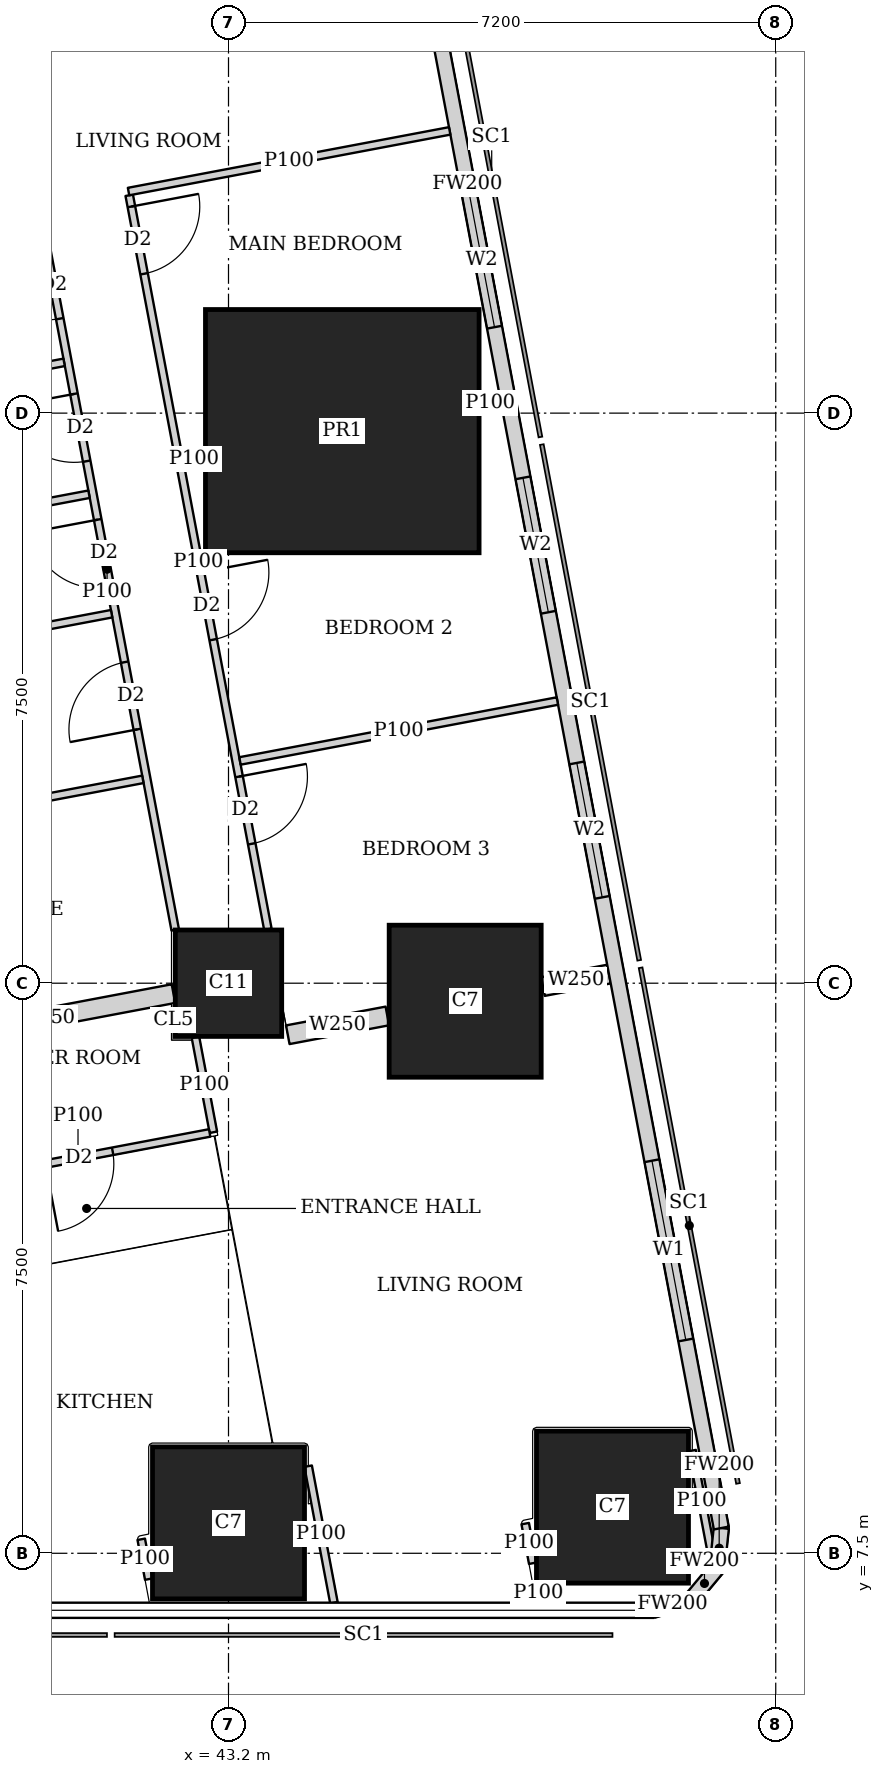
"""IFC4 building model, lengths in metres.
Left out: names, types, materials, properties, quantities, classifications, styles, units other than length and angle.
Written with IfcOpenShell. Run it as: python <this file> out.ifc"""

import sys

from ifc_helpers import new_model, si_unit, direction, frame, frame_2d, origin, origin_2d, place, context, subcontext, project, spatial, rectangle, extrude, element, fill, save


model = new_model("IFC4")
c1 = context("Model", 3, precision=1e-05, world=origin(), true_north=direction((0.0, 1.0)))
c2 = subcontext(c1, "Body", "Model", "MODEL_VIEW")
j1 = project(units=[si_unit("LENGTHUNIT", "METRE"), si_unit("PLANEANGLEUNIT", "RADIAN")], contexts=[c1])
p1 = place(None, origin())
s1 = spatial("IfcSite", under=j1, at=p1, CompositionType="ELEMENT")
p2 = place(p1, origin())
s2 = spatial("IfcBuilding", under=s1, at=p2, CompositionType="ELEMENT")
p3 = place(p2, frame((0.0, 0.0, 277.85)))
s3 = spatial("IfcBuildingStorey", under=s2, at=p3, CompositionType="ELEMENT", Elevation=277.85)
for number, where, z_axis, x_axis in (
    (1, (43.2, 7.9, 0.0), (0.0, 0.0, 1.0), (1.0, 0.0, 0.0)),
    (2, (48.252, 8.107, 0.0), (0.0, 0.0, 1.0), (1.0, 0.0, 0.0)),
):
    element("IfcColumn", number, at=place(p3, frame(where, z_axis=z_axis, x_axis=x_axis)), inside=s3, PredefinedType="COLUMN", context=c2, shape_type="SweptSolid", body=[
        extrude(rectangle(XDim=2.0, YDim=2.0, at=origin_2d()), origin(), (0.0, 0.0, 1.0), 3.75),
    ])
p4 = place(p3, frame((43.2, 15.0, 0.0), z_axis=(0.0, 0.0, 1.0), x_axis=(1.0, 0.0, 0.0)))
e3 = element("IfcColumn", 3, at=p4, inside=s3, PredefinedType="COLUMN", context=c2, shape_type="SweptSolid", body=[
    extrude(rectangle(XDim=1.4, YDim=1.4, at=origin_2d()), origin(), (0.0, 0.0, 1.0), 3.75),
])
p5 = place(p3, frame((46.314, 14.763, 0.0), z_axis=(0.0, 0.0, 1.0), x_axis=(1.0, 0.0, 0.0)))
e4 = element("IfcColumn", 4, at=p5, inside=s3, PredefinedType="COLUMN", context=c2, shape_type="SweptSolid", body=[
    extrude(rectangle(XDim=2.0, YDim=2.0, at=origin_2d()), origin(), (0.0, 0.0, 1.0), 3.75),
])
p6 = place(p3, frame((44.697, 22.263, 0.0), z_axis=(0.0, 0.0, 1.0), x_axis=(1.0, 0.0, 0.0)))
e5 = element("IfcColumn", 5, at=p6, inside=s3, PredefinedType="COLUMN", context=c2, shape_type="SweptSolid", body=[
    extrude(rectangle(XDim=3.6, YDim=3.2, at=origin_2d()), origin(), (0.0, 0.0, 1.0), 3.75),
])
p7 = place(p3, frame((48.787, 6.75, 0.0), z_axis=(0.0, 0.0, 1.0), x_axis=(0.957282247819, 0.289155145225, 0.0)))
e6 = element("IfcWall", 6, at=p7, inside=s3, PredefinedType="SOLIDWALL", context=c2, shape_type="SweptSolid", body=[
    extrude(rectangle(XDim=0.533, YDim=0.2, at=frame_2d((0.266, 0.0))), origin(), (0.0, 0.0, 1.0), 3.5),
])
p8 = place(p3, frame((49.297, 6.904, 0.0), z_axis=(0.0, 0.0, 1.0), x_axis=(0.639255849474, 0.768994121508, 0.0)))
e7 = element("IfcWall", 7, at=p8, inside=s3, PredefinedType="SOLIDWALL", context=c2, shape_type="SweptSolid", body=[
    extrude(rectangle(XDim=0.518, YDim=0.2, at=frame_2d((0.259, 0.0))), origin(), (0.0, 0.0, 1.0), 3.5),
])
p9 = place(p3, frame((49.628, 7.302, 0.0), z_axis=(0.0, 0.0, 1.0), x_axis=(0.105352390132, 0.994434952068, 0.0)))
e8 = element("IfcWall", 8, at=p9, inside=s3, PredefinedType="SOLIDWALL", context=c2, shape_type="SweptSolid", body=[
    extrude(rectangle(XDim=0.533, YDim=0.2, at=frame_2d((0.267, 0.0))), origin(), (0.0, 0.0, 1.0), 3.5),
])
p10 = place(p3, frame((49.684, 7.832, 0.0), z_axis=(0.0, 0.0, 1.0), x_axis=(-0.185616669694, 0.982622232565, 0.0)))
e9 = element("IfcWall", 9, at=p10, inside=s3, PredefinedType="SOLIDWALL", context=c2, shape_type="SweptSolid", body=[
    extrude(rectangle(XDim=36.0, YDim=0.2, at=frame_2d((18.0, 0.0))), origin(), (0.0, 0.0, 1.0), 3.5),
])
p11 = place(p10, frame((2.518, 0.0, 0.9)))
e10 = element("IfcOpeningElement", 10, at=p11, cuts=e9, PredefinedType="OPENING", context=c2, shape_type="SweptSolid", body=[
    extrude(rectangle(XDim=2.4, YDim=1.5, at=frame_2d((1.2, 0.75))), frame((0.0, 0.11, 0.0), z_axis=(0.0, -1.0, 0.0), x_axis=(1.0, 0.0, 0.0)), (0.0, 0.0, 1.0), 0.22),
])
p12 = place(p10, frame((8.444, 0.0, 0.9)))
e11 = element("IfcOpeningElement", 11, at=p12, cuts=e9, PredefinedType="OPENING", context=c2, shape_type="SweptSolid", body=[
    extrude(rectangle(XDim=1.8, YDim=1.5, at=frame_2d((0.9, 0.75))), frame((0.0, 0.11, 0.0), z_axis=(0.0, -1.0, 0.0), x_axis=(1.0, 0.0, 0.0)), (0.0, 0.0, 1.0), 0.22),
])
p13 = place(p10, frame((12.261, 0.0, 0.9)))
e12 = element("IfcOpeningElement", 12, at=p13, cuts=e9, PredefinedType="OPENING", context=c2, shape_type="SweptSolid", body=[
    extrude(rectangle(XDim=1.8, YDim=1.5, at=frame_2d((0.9, 0.75))), frame((0.0, 0.11, 0.0), z_axis=(0.0, -1.0, 0.0), x_axis=(1.0, 0.0, 0.0)), (0.0, 0.0, 1.0), 0.22),
])
p14 = place(p10, frame((16.078, 0.0, 0.9)))
e13 = element("IfcOpeningElement", 13, at=p14, cuts=e9, PredefinedType="OPENING", context=c2, shape_type="SweptSolid", body=[
    extrude(rectangle(XDim=1.8, YDim=1.5, at=frame_2d((0.9, 0.75))), frame((0.0, 0.11, 0.0), z_axis=(0.0, -1.0, 0.0), x_axis=(1.0, 0.0, 0.0)), (0.0, 0.0, 1.0), 0.22),
])
p15 = place(p10, frame((19.894, 0.0, 0.9)))
e14 = element("IfcOpeningElement", 14, at=p15, cuts=e9, PredefinedType="OPENING", context=c2, shape_type="SweptSolid", body=[
    extrude(rectangle(XDim=1.8, YDim=1.5, at=frame_2d((0.9, 0.75))), frame((0.0, 0.11, 0.0), z_axis=(0.0, -1.0, 0.0), x_axis=(1.0, 0.0, 0.0)), (0.0, 0.0, 1.0), 0.22),
])
p16 = place(p10, frame((23.71, 0.0, 0.9)))
e15 = element("IfcOpeningElement", 15, at=p16, cuts=e9, PredefinedType="OPENING", context=c2, shape_type="SweptSolid", body=[
    extrude(rectangle(XDim=1.8, YDim=1.5, at=frame_2d((0.9, 0.75))), frame((0.0, 0.11, 0.0), z_axis=(0.0, -1.0, 0.0), x_axis=(1.0, 0.0, 0.0)), (0.0, 0.0, 1.0), 0.22),
])
p17 = place(p10, frame((27.526, 0.0, 0.9)))
e16 = element("IfcOpeningElement", 16, at=p17, cuts=e9, PredefinedType="OPENING", context=c2, shape_type="SweptSolid", body=[
    extrude(rectangle(XDim=1.8, YDim=1.5, at=frame_2d((0.9, 0.75))), frame((0.0, 0.11, 0.0), z_axis=(0.0, -1.0, 0.0), x_axis=(1.0, 0.0, 0.0)), (0.0, 0.0, 1.0), 0.22),
])
p18 = place(p10, frame((32.046, 0.0, 0.9)))
e17 = element("IfcOpeningElement", 17, at=p18, cuts=e9, PredefinedType="OPENING", context=c2, shape_type="SweptSolid", body=[
    extrude(rectangle(XDim=1.8, YDim=1.5, at=frame_2d((0.9, 0.75))), frame((0.0, 0.11, 0.0), z_axis=(0.0, -1.0, 0.0), x_axis=(1.0, 0.0, 0.0)), (0.0, 0.0, 1.0), 0.22),
])
p19 = place(p3, frame((44.248, 8.646, 0.0), z_axis=(0.0, 0.0, 1.0), x_axis=(0.185417594585, -0.982659816833, 0.0)))
e18 = element("IfcWall", 18, at=p19, inside=s3, PredefinedType="PARTITIONING", context=c2, shape_type="SweptSolid", body=[
    extrude(rectangle(XDim=1.828, YDim=0.1, at=frame_2d((0.914, 0.0))), origin(), (0.0, 0.0, 1.0), 2.05),
])
p20 = place(p3, frame((42.151, 7.16, 0.0), z_axis=(0.0, 0.0, 1.0), x_axis=(-0.185366164644, 0.982669519729, 0.0)))
e19 = element("IfcWall", 19, at=p20, inside=s3, PredefinedType="PARTITIONING", context=c2, shape_type="SweptSolid", body=[
    extrude(rectangle(XDim=0.533, YDim=0.1, at=frame_2d((0.267, 0.0))), origin(), (0.0, 0.0, 1.0), 2.5),
])
p21 = place(p3, frame((49.3, 8.851, 0.0), z_axis=(0.0, 0.0, 1.0), x_axis=(0.18581620423, -0.982584519645, 0.0)))
e20 = element("IfcWall", 20, at=p21, inside=s3, PredefinedType="PARTITIONING", context=c2, shape_type="SweptSolid", body=[
    extrude(rectangle(XDim=1.351, YDim=0.1, at=frame_2d((0.675, 0.0))), origin(), (0.0, 0.0, 1.0), 3.5),
])
p22 = place(p3, frame((47.301, 6.85, 0.0), z_axis=(0.0, 0.0, 1.0), x_axis=(-0.187513903188, 0.982261948826, 0.0)))
e21 = element("IfcWall", 21, at=p22, inside=s3, PredefinedType="PARTITIONING", context=c2, shape_type="SweptSolid", body=[
    extrude(rectangle(XDim=0.251, YDim=0.1, at=frame_2d((0.125, 0.0))), origin(), (0.0, 0.0, 1.0), 3.5),
])
p23 = place(p3, frame((47.203, 7.369, 0.0), z_axis=(0.0, 0.0, 1.0), x_axis=(-0.186456243114, 0.982463266185, 0.0)))
e22 = element("IfcWall", 22, at=p23, inside=s3, PredefinedType="PARTITIONING", context=c2, shape_type="SweptSolid", body=[
    extrude(rectangle(XDim=0.53, YDim=0.1, at=frame_2d((0.265, 0.0))), origin(), (0.0, 0.0, 1.0), 2.05),
])
p24 = place(p3, frame((41.894, 25.366, 0.0), z_axis=(0.0, 0.0, 1.0), x_axis=(0.185612905165, -0.982622943675, 0.0)))
e23 = element("IfcWall", 23, at=p24, inside=s3, PredefinedType="PARTITIONING", context=c2, shape_type="SweptSolid", body=[
    extrude(rectangle(XDim=9.827, YDim=0.1, at=frame_2d((4.913, 0.0))), origin(), (0.0, 0.0, 1.0), 2.5),
])
p25 = place(p24, frame((0.151, 0.0, 0.0)))
e24 = element("IfcOpeningElement", 24, at=p25, cuts=e23, PredefinedType="OPENING", context=c2, shape_type="SweptSolid", body=[
    extrude(rectangle(XDim=0.9, YDim=2.1, at=frame_2d((0.45, 1.05))), frame((0.0, 0.06, 0.0), z_axis=(0.0, -1.0, 0.0), x_axis=(1.0, 0.0, 0.0)), (0.0, 0.0, 1.0), 0.12),
])
p26 = place(p24, frame((5.05, 0.0, 0.0)))
e25 = element("IfcOpeningElement", 25, at=p26, cuts=e23, PredefinedType="OPENING", context=c2, shape_type="SweptSolid", body=[
    extrude(rectangle(XDim=0.9, YDim=2.1, at=frame_2d((0.45, 1.05))), frame((0.0, 0.06, 0.0), z_axis=(0.0, -1.0, 0.0), x_axis=(1.0, 0.0, 0.0)), (0.0, 0.0, 1.0), 0.12),
])
p27 = place(p24, frame((7.783, 0.0, 0.0)))
e26 = element("IfcOpeningElement", 26, at=p27, cuts=e23, PredefinedType="OPENING", context=c2, shape_type="SweptSolid", body=[
    extrude(rectangle(XDim=0.9, YDim=2.1, at=frame_2d((0.45, 1.05))), frame((0.0, 0.06, 0.0), z_axis=(0.0, -1.0, 0.0), x_axis=(1.0, 0.0, 0.0)), (0.0, 0.0, 1.0), 0.12),
])
p28 = place(p3, frame((40.706, 25.192, 0.0), z_axis=(0.0, 0.0, 1.0), x_axis=(0.185629824463, -0.982619747547, 0.0)))
e27 = element("IfcWall", 27, at=p28, inside=s3, PredefinedType="PARTITIONING", context=c2, shape_type="SweptSolid", body=[
    extrude(rectangle(XDim=9.659, YDim=0.1, at=frame_2d((4.83, 0.0))), origin(), (0.0, 0.0, 1.0), 2.5),
])
p29 = place(p28, frame((0.575, 0.0, 0.0)))
e28 = element("IfcOpeningElement", 28, at=p29, cuts=e27, PredefinedType="OPENING", context=c2, shape_type="SweptSolid", body=[
    extrude(rectangle(XDim=0.9, YDim=2.1, at=frame_2d((0.45, 1.05))), frame((0.0, 0.06, 0.0), z_axis=(0.0, -1.0, 0.0), x_axis=(1.0, 0.0, 0.0)), (0.0, 0.0, 1.0), 0.12),
])
p30 = place(p28, frame((4.166, 0.0, 0.0)))
e29 = element("IfcOpeningElement", 29, at=p30, cuts=e27, PredefinedType="OPENING", context=c2, shape_type="SweptSolid", body=[
    extrude(rectangle(XDim=0.9, YDim=2.1, at=frame_2d((0.45, 1.05))), frame((0.0, 0.06, 0.0), z_axis=(0.0, -1.0, 0.0), x_axis=(1.0, 0.0, 0.0)), (0.0, 0.0, 1.0), 0.12),
])
p31 = place(p28, frame((2.483, 0.0, 0.0)))
e30 = element("IfcOpeningElement", 30, at=p31, cuts=e27, PredefinedType="OPENING", context=c2, shape_type="SweptSolid", body=[
    extrude(rectangle(XDim=0.9, YDim=2.1, at=frame_2d((0.45, 1.05))), frame((0.0, 0.06, 0.0), z_axis=(0.0, -1.0, 0.0), x_axis=(1.0, 0.0, 0.0)), (0.0, 0.0, 1.0), 0.12),
])
p32 = place(p28, frame((6.074, 0.0, 0.0)))
e31 = element("IfcOpeningElement", 31, at=p32, cuts=e27, PredefinedType="OPENING", context=c2, shape_type="SweptSolid", body=[
    extrude(rectangle(XDim=0.9, YDim=2.1, at=frame_2d((0.45, 1.05))), frame((0.0, 0.06, 0.0), z_axis=(0.0, -1.0, 0.0), x_axis=(1.0, 0.0, 0.0)), (0.0, 0.0, 1.0), 0.12),
])
p33 = place(p3, frame((46.11, 26.213, 0.0), z_axis=(0.0, 0.0, 1.0), x_axis=(-0.982633535512, -0.185556823879, 0.0)))
e32 = element("IfcWall", 32, at=p33, inside=s3, PredefinedType="PARTITIONING", context=c2, shape_type="SweptSolid", body=[
    extrude(rectangle(XDim=4.3, YDim=0.1, at=frame_2d((2.15, 0.0))), origin(), (0.0, 0.0, 1.0), 2.5),
])
p34 = place(p3, frame((46.782, 22.657, 0.0), z_axis=(0.0, 0.0, 1.0), x_axis=(-0.982574553168, -0.185868898601, 0.0)))
e33 = element("IfcWall", 33, at=p34, inside=s3, PredefinedType="PARTITIONING", context=c2, shape_type="SweptSolid", body=[
    extrude(rectangle(XDim=0.28, YDim=0.1, at=frame_2d((0.14, 0.0))), origin(), (0.0, 0.0, 1.0), 3.5),
])
p35 = place(p3, frame((42.887, 21.921, 0.0), z_axis=(0.0, 0.0, 1.0), x_axis=(-0.982688058078, -0.185267861514, 0.0)))
e34 = element("IfcWall", 34, at=p35, inside=s3, PredefinedType="PARTITIONING", context=c2, shape_type="SweptSolid", body=[
    extrude(rectangle(XDim=0.286, YDim=0.1, at=frame_2d((0.143, 0.0))), origin(), (0.0, 0.0, 1.0), 2.5),
])
p36 = place(p3, frame((47.527, 18.712, 0.0), z_axis=(0.0, 0.0, 1.0), x_axis=(-0.982665405803, -0.185387972203, 0.0)))
e35 = element("IfcWall", 35, at=p36, inside=s3, PredefinedType="PARTITIONING", context=c2, shape_type="SweptSolid", body=[
    extrude(rectangle(XDim=4.25, YDim=0.1, at=frame_2d((2.125, 0.0))), origin(), (0.0, 0.0, 1.0), 2.5),
])
p37 = place(p3, frame((41.365, 21.433, 0.0), z_axis=(0.0, 0.0, 1.0), x_axis=(-0.982638553676, -0.185530247748, 0.0)))
e36 = element("IfcWall", 36, at=p37, inside=s3, PredefinedType="PARTITIONING", context=c2, shape_type="SweptSolid", body=[
    extrude(rectangle(XDim=3.525, YDim=0.1, at=frame_2d((1.763, 0.0))), origin(), (0.0, 0.0, 1.0), 3.5),
])
p38 = place(p3, frame((42.073, 17.682, 0.0), z_axis=(0.0, 0.0, 1.0), x_axis=(-0.98265117712, -0.185463376723, 0.0)))
e37 = element("IfcWall", 37, at=p38, inside=s3, PredefinedType="PARTITIONING", context=c2, shape_type="SweptSolid", body=[
    extrude(rectangle(XDim=3.525, YDim=0.1, at=frame_2d((1.763, 0.0))), origin(), (0.0, 0.0, 1.0), 3.5),
])
p39 = place(p38, frame((1.325, 0.0, 0.0)))
e38 = element("IfcOpeningElement", 38, at=p39, cuts=e37, PredefinedType="OPENING", context=c2, shape_type="SweptSolid", body=[
    extrude(rectangle(XDim=0.9, YDim=2.1, at=frame_2d((0.45, 1.05))), frame((0.0, 0.06, 0.0), z_axis=(0.0, -1.0, 0.0), x_axis=(1.0, 0.0, 0.0)), (0.0, 0.0, 1.0), 0.12),
])
p40 = place(p3, frame((41.037, 23.168, 0.0), z_axis=(0.0, 0.0, 1.0), x_axis=(-0.982638553676, -0.185530247748, 0.0)))
e39 = element("IfcWall", 39, at=p40, inside=s3, PredefinedType="PARTITIONING", context=c2, shape_type="SweptSolid", body=[
    extrude(rectangle(XDim=3.525, YDim=0.1, at=frame_2d((1.763, 0.0))), origin(), (0.0, 0.0, 1.0), 2.5),
])
p41 = place(p3, frame((41.662, 19.861, 0.0), z_axis=(0.0, 0.0, 1.0), x_axis=(-0.982588017646, -0.185797706064, 0.0)))
e40 = element("IfcWall", 40, at=p41, inside=s3, PredefinedType="PARTITIONING", context=c2, shape_type="SweptSolid", body=[
    extrude(rectangle(XDim=3.525, YDim=0.1, at=frame_2d((1.763, 0.0))), origin(), (0.0, 0.0, 1.0), 3.5),
])
p42 = place(p3, frame((42.765, 14.29, 0.0), z_axis=(0.0, 0.0, 1.0), x_axis=(0.185446293138, -0.982654401283, 0.0)))
e41 = element("IfcWall", 41, at=p42, inside=s3, PredefinedType="PARTITIONING", context=c2, shape_type="SweptSolid", body=[
    extrude(rectangle(XDim=1.273, YDim=0.1, at=frame_2d((0.636, 0.0))), origin(), (0.0, 0.0, 1.0), 3.5),
])
p43 = place(p3, frame((42.952, 13.03, 0.0), z_axis=(0.0, 0.0, 1.0), x_axis=(-0.982585626838, -0.185810349366, 0.0)))
e42 = element("IfcWall", 42, at=p43, inside=s3, PredefinedType="PARTITIONING", context=c2, shape_type="SweptSolid", body=[
    extrude(rectangle(XDim=3.525, YDim=0.1, at=frame_2d((1.763, 0.0))), origin(), (0.0, 0.0, 1.0), 3.5),
])
p44 = place(p43, frame((1.299, 0.0, 0.0)))
e43 = element("IfcOpeningElement", 43, at=p44, cuts=e42, PredefinedType="OPENING", context=c2, shape_type="SweptSolid", body=[
    extrude(rectangle(XDim=0.9, YDim=2.1, at=frame_2d((0.45, 1.05))), frame((0.0, 0.06, 0.0), z_axis=(0.0, -1.0, 0.0), x_axis=(1.0, 0.0, 0.0)), (0.0, 0.0, 1.0), 0.12),
])
p45 = place(p3, frame((48.206, 15.12, 0.0), z_axis=(0.0, 0.0, 1.0), x_axis=(-0.982608419258, -0.185689780017, 0.0)))
e44 = element("IfcWall", 44, at=p45, inside=s3, PredefinedType="SOLIDWALL", context=c2, shape_type="SweptSolid", body=[
    extrude(rectangle(XDim=0.884, YDim=0.25, at=frame_2d((0.442, 0.0))), origin(), (0.0, 0.0, 1.0), 3.5),
])
p46 = place(p3, frame((45.29, 14.569, 0.0), z_axis=(0.0, 0.0, 1.0), x_axis=(-0.982676759201, -0.185327782391, 0.0)))
e45 = element("IfcWall", 45, at=p46, inside=s3, PredefinedType="SOLIDWALL", context=c2, shape_type="SweptSolid", body=[
    extrude(rectangle(XDim=1.333, YDim=0.25, at=frame_2d((0.667, 0.0))), origin(), (0.0, 0.0, 1.0), 3.5),
])
p47 = place(p3, frame((42.476, 14.863, 0.0), z_axis=(0.0, 0.0, 1.0), x_axis=(-0.982603567712, -0.185715450942, 0.0)))
e46 = element("IfcWall", 46, at=p47, inside=s3, PredefinedType="SOLIDWALL", context=c2, shape_type="SweptSolid", body=[
    extrude(rectangle(XDim=3.398, YDim=0.25, at=frame_2d((1.699, 0.0))), origin(), (0.0, 0.0, 1.0), 3.5),
])
p48 = place(p11, origin())
e47 = element("IfcWindow", 47, at=p48, inside=s3, PartitioningType="SINGLE_PANEL", PredefinedType="WINDOW", context=c2, shape_type="SweptSolid", body=[
    extrude(rectangle(XDim=2.4, YDim=1.5, at=frame_2d((1.2, 0.75))), frame((0.0, 0.03, 0.0), z_axis=(0.0, -1.0, 0.0), x_axis=(1.0, 0.0, 0.0)), (0.0, 0.0, 1.0), 0.06),
])
fill(e10, e47)
p49 = place(p12, origin())
e48 = element("IfcWindow", 48, at=p49, inside=s3, PartitioningType="SINGLE_PANEL", PredefinedType="WINDOW", context=c2, shape_type="SweptSolid", body=[
    extrude(rectangle(XDim=1.8, YDim=1.5, at=frame_2d((0.9, 0.75))), frame((0.0, 0.03, 0.0), z_axis=(0.0, -1.0, 0.0), x_axis=(1.0, 0.0, 0.0)), (0.0, 0.0, 1.0), 0.06),
])
fill(e11, e48)
p50 = place(p13, origin())
e49 = element("IfcWindow", 49, at=p50, inside=s3, PartitioningType="SINGLE_PANEL", PredefinedType="WINDOW", context=c2, shape_type="SweptSolid", body=[
    extrude(rectangle(XDim=1.8, YDim=1.5, at=frame_2d((0.9, 0.75))), frame((0.0, 0.03, 0.0), z_axis=(0.0, -1.0, 0.0), x_axis=(1.0, 0.0, 0.0)), (0.0, 0.0, 1.0), 0.06),
])
fill(e12, e49)
p51 = place(p14, origin())
e50 = element("IfcWindow", 50, at=p51, inside=s3, PartitioningType="SINGLE_PANEL", PredefinedType="WINDOW", context=c2, shape_type="SweptSolid", body=[
    extrude(rectangle(XDim=1.8, YDim=1.5, at=frame_2d((0.9, 0.75))), frame((0.0, 0.03, 0.0), z_axis=(0.0, -1.0, 0.0), x_axis=(1.0, 0.0, 0.0)), (0.0, 0.0, 1.0), 0.06),
])
fill(e13, e50)
p52 = place(p25, origin())
e51 = element("IfcDoor", 51, at=p52, inside=s3, OperationType="SINGLE_SWING_LEFT", PredefinedType="DOOR", context=c2, shape_type="SweptSolid", body=[
    extrude(rectangle(XDim=0.9, YDim=2.1, at=frame_2d((0.45, 1.05))), frame((0.0, 0.025, 0.0), z_axis=(0.0, -1.0, 0.0), x_axis=(1.0, 0.0, 0.0)), (0.0, 0.0, 1.0), 0.05),
])
fill(e24, e51)
p53 = place(p26, origin())
e52 = element("IfcDoor", 52, at=p53, inside=s3, OperationType="SINGLE_SWING_LEFT", PredefinedType="DOOR", context=c2, shape_type="SweptSolid", body=[
    extrude(rectangle(XDim=0.9, YDim=2.1, at=frame_2d((0.45, 1.05))), frame((0.0, 0.025, 0.0), z_axis=(0.0, -1.0, 0.0), x_axis=(1.0, 0.0, 0.0)), (0.0, 0.0, 1.0), 0.05),
])
fill(e25, e52)
p54 = place(p27, origin())
e53 = element("IfcDoor", 53, at=p54, inside=s3, OperationType="SINGLE_SWING_LEFT", PredefinedType="DOOR", context=c2, shape_type="SweptSolid", body=[
    extrude(rectangle(XDim=0.9, YDim=2.1, at=frame_2d((0.45, 1.05))), frame((0.0, 0.025, 0.0), z_axis=(0.0, -1.0, 0.0), x_axis=(1.0, 0.0, 0.0)), (0.0, 0.0, 1.0), 0.05),
])
fill(e26, e53)
p55 = place(p29, origin())
e54 = element("IfcDoor", 54, at=p55, inside=s3, OperationType="SINGLE_SWING_RIGHT", PredefinedType="DOOR", context=c2, shape_type="SweptSolid", body=[
    extrude(rectangle(XDim=0.9, YDim=2.1, at=frame_2d((0.45, 1.05))), frame((0.0, 0.025, 0.0), z_axis=(0.0, -1.0, 0.0), x_axis=(1.0, 0.0, 0.0)), (0.0, 0.0, 1.0), 0.05),
])
fill(e28, e54)
p56 = place(p30, origin())
e55 = element("IfcDoor", 55, at=p56, inside=s3, OperationType="SINGLE_SWING_RIGHT", PredefinedType="DOOR", context=c2, shape_type="SweptSolid", body=[
    extrude(rectangle(XDim=0.9, YDim=2.1, at=frame_2d((0.45, 1.05))), frame((0.0, 0.025, 0.0), z_axis=(0.0, -1.0, 0.0), x_axis=(1.0, 0.0, 0.0)), (0.0, 0.0, 1.0), 0.05),
])
fill(e29, e55)
p57 = place(p31, origin())
e56 = element("IfcDoor", 56, at=p57, inside=s3, OperationType="SINGLE_SWING_RIGHT", PredefinedType="DOOR", context=c2, shape_type="SweptSolid", body=[
    extrude(rectangle(XDim=0.9, YDim=2.1, at=frame_2d((0.45, 1.05))), frame((0.0, 0.025, 0.0), z_axis=(0.0, -1.0, 0.0), x_axis=(1.0, 0.0, 0.0)), (0.0, 0.0, 1.0), 0.05),
])
fill(e30, e56)
p58 = place(p32, origin())
e57 = element("IfcDoor", 57, at=p58, inside=s3, OperationType="SINGLE_SWING_LEFT", PredefinedType="DOOR", context=c2, shape_type="SweptSolid", body=[
    extrude(rectangle(XDim=0.9, YDim=2.1, at=frame_2d((0.45, 1.05))), frame((0.0, 0.025, 0.0), z_axis=(0.0, -1.0, 0.0), x_axis=(1.0, 0.0, 0.0)), (0.0, 0.0, 1.0), 0.05),
])
fill(e31, e57)
p59 = place(p44, origin())
e58 = element("IfcDoor", 58, at=p59, inside=s3, OperationType="SINGLE_SWING_RIGHT", PredefinedType="DOOR", context=c2, shape_type="SweptSolid", body=[
    extrude(rectangle(XDim=0.9, YDim=2.1, at=frame_2d((0.45, 1.05))), frame((0.0, 0.025, 0.0), z_axis=(0.0, -1.0, 0.0), x_axis=(1.0, 0.0, 0.0)), (0.0, 0.0, 1.0), 0.05),
])
fill(e43, e58)
save(model, sys.argv[1])
